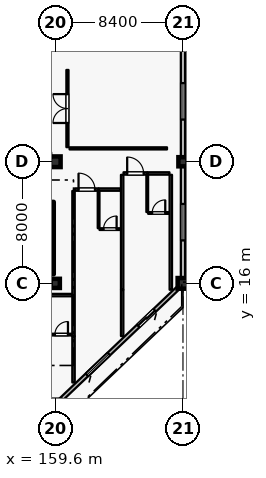
"""IFC4 building model, lengths in metres.
Left out: names, types, materials, properties, quantities, classifications, styles, units other than length and angle.
Written with IfcOpenShell. Run it as: python <this file> out.ifc"""

import sys

from ifc_helpers import new_model, si_unit, direction, frame, frame_2d, origin, origin_2d, place, context, subcontext, project, spatial, rectangle, extrude, element, fill, save


model = new_model("IFC4")
c1 = context("Model", 3, precision=1e-05, world=origin(), true_north=direction((0.0, 1.0)))
c2 = subcontext(c1, "Body", "Model", "MODEL_VIEW")
j1 = project(units=[si_unit("LENGTHUNIT", "METRE"), si_unit("PLANEANGLEUNIT", "RADIAN")], contexts=[c1])
p1 = place(None, origin())
s1 = spatial("IfcSite", under=j1, at=p1, CompositionType="ELEMENT")
p2 = place(p1, origin())
s2 = spatial("IfcBuilding", under=s1, at=p2, CompositionType="ELEMENT")
p3 = place(p2, frame((0.0, 0.0, 36.0)))
s3 = spatial("IfcBuildingStorey", under=s2, at=p3, CompositionType="ELEMENT", Elevation=36.0)
for number, where, z_axis, x_axis in (
    (1, (159.6, 24.0, 0.0), (0.0, 0.0, 1.0), (1.0, 0.0, 0.0)),
    (2, (168.0, 16.0, 0.0), (0.0, 0.0, 1.0), (1.0, 0.0, 0.0)),
):
    element("IfcColumn", number, at=place(p3, frame(where, z_axis=z_axis, x_axis=x_axis)), inside=s3, PredefinedType="COLUMN", context=c2, shape_type="SweptSolid", body=[
        extrude(rectangle(XDim=0.7, YDim=0.7, at=origin_2d()), origin(), (0.0, 0.0, 1.0), 3.6),
    ])
for number, where, z_axis, x_axis in (
    (3, (159.6, 16.0, 0.0), (0.0, 0.0, 1.0), (1.0, 0.0, 0.0)),
    (4, (168.0, 24.0, 0.0), (0.0, 0.0, 1.0), (1.0, 0.0, 0.0)),
):
    element("IfcColumn", number, at=place(p3, frame(where, z_axis=z_axis, x_axis=x_axis)), inside=s3, PredefinedType="COLUMN", context=c2, shape_type="SweptSolid", body=[
        extrude(rectangle(XDim=0.6, YDim=0.6, at=origin_2d()), origin(), (0.0, 0.0, 1.0), 3.6),
    ])
p4 = place(p3, frame((167.65, 15.667, 0.0), z_axis=(0.0, 0.0, 1.0), x_axis=(-0.724105170588, -0.689689569247, 0.0)))
e5 = element("IfcWall", 5, at=p4, inside=s3, PredefinedType="SOLIDWALL", context=c2, shape_type="SweptSolid", body=[
    extrude(rectangle(XDim=10.634, YDim=0.24, at=frame_2d((5.317, 0.0))), origin(), (0.0, 0.0, 1.0), 2.94),
])
p5 = place(p4, frame((2.081, 0.0, 0.0)))
e6 = element("IfcOpeningElement", 6, at=p5, cuts=e5, PredefinedType="OPENING", context=c2, shape_type="SweptSolid", body=[
    extrude(rectangle(XDim=1.5, YDim=2.25, at=frame_2d((0.75, 1.125))), frame((0.0, 0.13, 0.0), z_axis=(0.0, -1.0, 0.0), x_axis=(1.0, 0.0, 0.0)), (0.0, 0.0, 1.0), 0.26),
])
p6 = place(p4, frame((6.25, 0.0, 0.8)))
e7 = element("IfcOpeningElement", 7, at=p6, cuts=e5, PredefinedType="OPENING", context=c2, shape_type="SweptSolid", body=[
    extrude(rectangle(XDim=2.0, YDim=1.75, at=frame_2d((1.0, 0.875))), frame((0.0, 0.13, 0.0), z_axis=(0.0, -1.0, 0.0), x_axis=(1.0, 0.0, 0.0)), (0.0, 0.0, 1.0), 0.26),
])
p7 = place(p3, frame((168.0, 31.65, 0.0), z_axis=(0.0, 0.0, 1.0), x_axis=(0.0, -1.0, 0.0)))
e8 = element("IfcWall", 8, at=p7, inside=s3, PredefinedType="SOLIDWALL", context=c2, shape_type="SweptSolid", body=[
    extrude(rectangle(XDim=7.35, YDim=0.28, at=frame_2d((3.675, 0.0))), origin(), (0.0, 0.0, 1.0), 2.7),
])
p8 = place(p7, frame((2.475, 0.0, 0.5)))
e9 = element("IfcOpeningElement", 9, at=p8, cuts=e8, PredefinedType="OPENING", context=c2, shape_type="SweptSolid", body=[
    extrude(rectangle(XDim=2.4, YDim=1.65, at=frame_2d((1.2, 0.825))), frame((0.0, 0.15, 0.0), z_axis=(0.0, -1.0, 0.0), x_axis=(1.0, 0.0, 0.0)), (0.0, 0.0, 1.0), 0.3),
])
p9 = place(p3, frame((168.0, 23.7, 0.0), z_axis=(0.0, 0.0, 1.0), x_axis=(0.0, -1.0, 0.0)))
e10 = element("IfcWall", 10, at=p9, inside=s3, PredefinedType="SOLIDWALL", context=c2, shape_type="SweptSolid", body=[
    extrude(rectangle(XDim=7.35, YDim=0.28, at=frame_2d((3.675, 0.0))), origin(), (0.0, 0.0, 1.0), 2.7),
])
p10 = place(p9, frame((2.475, 0.0, 0.5)))
e11 = element("IfcOpeningElement", 11, at=p10, cuts=e10, PredefinedType="OPENING", context=c2, shape_type="SweptSolid", body=[
    extrude(rectangle(XDim=2.4, YDim=1.65, at=frame_2d((1.2, 0.825))), frame((0.0, 0.15, 0.0), z_axis=(0.0, -1.0, 0.0), x_axis=(1.0, 0.0, 0.0)), (0.0, 0.0, 1.0), 0.3),
])
p11 = place(p3, frame((151.3, 16.8, 0.0), z_axis=(0.0, 0.0, 1.0), x_axis=(1.0, 0.0, 0.0)))
e12 = element("IfcWall", 12, at=p11, inside=s3, PredefinedType="SHEAR", context=c2, shape_type="SweptSolid", body=[
    extrude(rectangle(XDim=8.2, YDim=0.4, at=frame_2d((4.1, 0.0))), origin(), (0.0, 0.0, 1.0), 3.365),
])
p12 = place(p3, frame((159.3, 17.005, 0.0), z_axis=(0.0, 0.0, 1.0), x_axis=(0.0, 1.0, 0.0)))
e13 = element("IfcWall", 13, at=p12, inside=s3, PredefinedType="SHEAR", context=c2, shape_type="SweptSolid", body=[
    extrude(rectangle(XDim=3.95, YDim=0.4, at=frame_2d((1.975, 0.0))), origin(), (0.0, 0.0, 1.0), 3.365),
])
p13 = place(p3, frame((151.3, 21.16, 0.0), z_axis=(0.0, 0.0, 1.0), x_axis=(1.0, 0.0, 0.0)))
e14 = element("IfcWall", 14, at=p13, inside=s3, PredefinedType="SHEAR", context=c2, shape_type="SweptSolid", body=[
    extrude(rectangle(XDim=8.2, YDim=0.4, at=frame_2d((4.1, 0.0))), origin(), (0.0, 0.0, 1.0), 3.365),
])
p14 = place(p13, frame((0.43, 0.0, 0.0)))
e15 = element("IfcOpeningElement", 15, at=p14, cuts=e14, PredefinedType="OPENING", context=c2, shape_type="SweptSolid", body=[
    extrude(rectangle(XDim=1.16, YDim=2.2, at=frame_2d((0.58, 1.1))), frame((0.0, 0.21, 0.0), z_axis=(0.0, -1.0, 0.0), x_axis=(1.0, 0.0, 0.0)), (0.0, 0.0, 1.0), 0.42),
])
p15 = place(p3, frame((159.26, 15.23, 0.0), z_axis=(0.0, 0.0, 1.0), x_axis=(1.0, 0.0, 0.0)))
e16 = element("IfcWall", 16, at=p15, inside=s3, PredefinedType="PARTITIONING", context=c2, shape_type="SweptSolid", body=[
    extrude(rectangle(XDim=1.45, YDim=0.16, at=frame_2d((0.725, 0.0))), origin(), (0.0, 0.0, 1.0), 3.365),
])
p16 = place(p3, frame((159.31, 12.63, 0.0), z_axis=(0.0, 0.0, 1.0), x_axis=(1.0, 0.0, 0.0)))
e17 = element("IfcWall", 17, at=p16, inside=s3, PredefinedType="PARTITIONING", context=c2, shape_type="SweptSolid", body=[
    extrude(rectangle(XDim=1.39, YDim=0.115, at=frame_2d((0.695, 0.0))), origin(), (0.0, 0.0, 1.0), 3.365),
])
p17 = place(p16, frame((0.265, 0.0, 0.0)))
e18 = element("IfcOpeningElement", 18, at=p17, cuts=e17, PredefinedType="OPENING", context=c2, shape_type="SweptSolid", body=[
    extrude(rectangle(XDim=0.86, YDim=2.12, at=frame_2d((0.43, 1.06))), frame((0.0, 0.067, 0.0), z_axis=(0.0, -1.0, 0.0), x_axis=(1.0, 0.0, 0.0)), (0.0, 0.0, 1.0), 0.135),
])
p18 = place(p3, frame((160.8, 9.48, 0.0), z_axis=(0.0, 0.0, 1.0), x_axis=(0.0, 1.0, 0.0)))
e19 = element("IfcWall", 19, at=p18, inside=s3, PredefinedType="PARTITIONING", context=c2, shape_type="SweptSolid", body=[
    extrude(rectangle(XDim=3.04, YDim=0.16, at=frame_2d((1.52, 0.0))), origin(), (0.0, 0.0, 1.0), 3.365),
])
p19 = place(p3, frame((160.89, 22.17, 0.0), z_axis=(0.0, 0.0, 1.0), x_axis=(1.0, 0.0, 0.0)))
e20 = element("IfcWall", 20, at=p19, inside=s3, PredefinedType="PARTITIONING", context=c2, shape_type="SweptSolid", body=[
    extrude(rectangle(XDim=1.56, YDim=0.16, at=frame_2d((0.78, 0.0))), origin(), (0.0, 0.0, 1.0), 3.365),
])
p20 = place(p19, frame((0.24, 0.0, 0.0)))
e21 = element("IfcOpeningElement", 21, at=p20, cuts=e20, PredefinedType="OPENING", context=c2, shape_type="SweptSolid", body=[
    extrude(rectangle(XDim=1.08, YDim=2.3, at=frame_2d((0.54, 1.15))), frame((0.0, 0.09, 0.0), z_axis=(0.0, -1.0, 0.0), x_axis=(1.0, 0.0, 0.0)), (0.0, 0.0, 1.0), 0.18),
])
p21 = place(p3, frame((162.46, 22.17, 0.0), z_axis=(0.0, 0.0, 1.0), x_axis=(1.0, 0.0, 0.0)))
e22 = element("IfcWall", 22, at=p21, inside=s3, PredefinedType="PARTITIONING", context=c2, shape_type="SweptSolid", body=[
    extrude(rectangle(XDim=1.45, YDim=0.16, at=frame_2d((0.725, 0.0))), origin(), (0.0, 0.0, 1.0), 3.365),
])
p22 = place(p3, frame((162.45, 19.63, 0.0), z_axis=(0.0, 0.0, 1.0), x_axis=(0.0, 1.0, 0.0)))
e23 = element("IfcWall", 23, at=p22, inside=s3, PredefinedType="PARTITIONING", context=c2, shape_type="SweptSolid", body=[
    extrude(rectangle(XDim=2.45, YDim=0.115, at=frame_2d((1.225, 0.0))), origin(), (0.0, 0.0, 1.0), 3.365),
])
p23 = place(p3, frame((162.51, 19.57, 0.0), z_axis=(0.0, 0.0, 1.0), x_axis=(1.0, 0.0, 0.0)))
e24 = element("IfcWall", 24, at=p23, inside=s3, PredefinedType="PARTITIONING", context=c2, shape_type="SweptSolid", body=[
    extrude(rectangle(XDim=1.39, YDim=0.115, at=frame_2d((0.695, 0.0))), origin(), (0.0, 0.0, 1.0), 3.365),
])
p24 = place(p23, frame((0.265, 0.0, 0.0)))
e25 = element("IfcOpeningElement", 25, at=p24, cuts=e24, PredefinedType="OPENING", context=c2, shape_type="SweptSolid", body=[
    extrude(rectangle(XDim=0.86, YDim=2.12, at=frame_2d((0.43, 1.06))), frame((0.0, 0.067, 0.0), z_axis=(0.0, -1.0, 0.0), x_axis=(1.0, 0.0, 0.0)), (0.0, 0.0, 1.0), 0.135),
])
p25 = place(p3, frame((160.8, 12.53, 0.0), z_axis=(0.0, 0.0, 1.0), x_axis=(0.0, 1.0, 0.0)))
e26 = element("IfcWall", 26, at=p25, inside=s3, PredefinedType="PARTITIONING", context=c2, shape_type="SweptSolid", body=[
    extrude(rectangle(XDim=9.55, YDim=0.16, at=frame_2d((4.775, 0.0))), origin(), (0.0, 0.0, 1.0), 3.365),
])
p26 = place(p3, frame((164.0, 12.53, 0.0), z_axis=(0.0, 0.0, 1.0), x_axis=(0.0, 1.0, 0.0)))
e27 = element("IfcWall", 27, at=p26, inside=s3, PredefinedType="PARTITIONING", context=c2, shape_type="SweptSolid", body=[
    extrude(rectangle(XDim=3.04, YDim=0.16, at=frame_2d((1.52, 0.0))), origin(), (0.0, 0.0, 1.0), 3.365),
])
p27 = place(p3, frame((164.09, 23.23, 0.0), z_axis=(0.0, 0.0, 1.0), x_axis=(1.0, 0.0, 0.0)))
e28 = element("IfcWall", 28, at=p27, inside=s3, PredefinedType="PARTITIONING", context=c2, shape_type="SweptSolid", body=[
    extrude(rectangle(XDim=1.56, YDim=0.16, at=frame_2d((0.78, 0.0))), origin(), (0.0, 0.0, 1.0), 3.365),
])
p28 = place(p27, frame((0.24, 0.0, 0.0)))
e29 = element("IfcOpeningElement", 29, at=p28, cuts=e28, PredefinedType="OPENING", context=c2, shape_type="SweptSolid", body=[
    extrude(rectangle(XDim=1.08, YDim=2.3, at=frame_2d((0.54, 1.15))), frame((0.0, 0.09, 0.0), z_axis=(0.0, -1.0, 0.0), x_axis=(1.0, 0.0, 0.0)), (0.0, 0.0, 1.0), 0.18),
])
p29 = place(p3, frame((165.66, 23.23, 0.0), z_axis=(0.0, 0.0, 1.0), x_axis=(1.0, 0.0, 0.0)))
e30 = element("IfcWall", 30, at=p29, inside=s3, PredefinedType="PARTITIONING", context=c2, shape_type="SweptSolid", body=[
    extrude(rectangle(XDim=1.45, YDim=0.16, at=frame_2d((0.725, 0.0))), origin(), (0.0, 0.0, 1.0), 3.365),
])
p30 = place(p3, frame((165.65, 20.69, 0.0), z_axis=(0.0, 0.0, 1.0), x_axis=(0.0, 1.0, 0.0)))
e31 = element("IfcWall", 31, at=p30, inside=s3, PredefinedType="PARTITIONING", context=c2, shape_type="SweptSolid", body=[
    extrude(rectangle(XDim=2.45, YDim=0.115, at=frame_2d((1.225, 0.0))), origin(), (0.0, 0.0, 1.0), 3.365),
])
p31 = place(p3, frame((165.71, 20.63, 0.0), z_axis=(0.0, 0.0, 1.0), x_axis=(1.0, 0.0, 0.0)))
e32 = element("IfcWall", 32, at=p31, inside=s3, PredefinedType="PARTITIONING", context=c2, shape_type="SweptSolid", body=[
    extrude(rectangle(XDim=1.39, YDim=0.115, at=frame_2d((0.695, 0.0))), origin(), (0.0, 0.0, 1.0), 3.365),
])
p32 = place(p31, frame((0.265, 0.0, 0.0)))
e33 = element("IfcOpeningElement", 33, at=p32, cuts=e32, PredefinedType="OPENING", context=c2, shape_type="SweptSolid", body=[
    extrude(rectangle(XDim=0.86, YDim=2.12, at=frame_2d((0.43, 1.06))), frame((0.0, 0.067, 0.0), z_axis=(0.0, -1.0, 0.0), x_axis=(1.0, 0.0, 0.0)), (0.0, 0.0, 1.0), 0.135),
])
for number, where, z_axis, x_axis in (
    (34, (164.0, 15.58, 0.0), (0.0, 0.0, 1.0), (0.0, 1.0, 0.0)),
    (35, (167.2, 15.58, 0.0), (0.0, 0.0, 1.0), (0.0, 1.0, 0.0)),
):
    element("IfcWall", number, at=place(p3, frame(where, z_axis=z_axis, x_axis=x_axis)), inside=s3, PredefinedType="PARTITIONING", context=c2, shape_type="SweptSolid", body=[
        extrude(rectangle(XDim=7.56, YDim=0.16, at=frame_2d((3.78, 0.0))), origin(), (0.0, 0.0, 1.0), 3.365),
    ])
p33 = place(p3, frame((160.4, 24.96, 0.0), z_axis=(0.0, 0.0, 1.0), x_axis=(0.0, 1.0, 0.0)))
e36 = element("IfcWall", 36, at=p33, inside=s3, PredefinedType="PARTITIONING", context=c2, shape_type="SweptSolid", body=[
    extrude(rectangle(XDim=5.08, YDim=0.14, at=frame_2d((2.54, 0.0))), origin(), (0.0, 0.0, 1.0), 3.365),
])
p34 = place(p33, frame((1.59, 0.0, 0.0)))
e37 = element("IfcOpeningElement", 37, at=p34, cuts=e36, PredefinedType="OPENING", context=c2, shape_type="SweptSolid", body=[
    extrude(rectangle(XDim=1.9, YDim=2.4, at=frame_2d((0.95, 1.2))), frame((0.0, 0.08, 0.0), z_axis=(0.0, -1.0, 0.0), x_axis=(1.0, 0.0, 0.0)), (0.0, 0.0, 1.0), 0.16),
])
p35 = place(p3, frame((160.54, 24.88, 0.0), z_axis=(0.0, 0.0, 1.0), x_axis=(1.0, 0.0, 0.0)))
e38 = element("IfcWall", 38, at=p35, inside=s3, PredefinedType="PARTITIONING", context=c2, shape_type="SweptSolid", body=[
    extrude(rectangle(XDim=6.41, YDim=0.14, at=frame_2d((3.205, 0.0))), origin(), (0.0, 0.0, 1.0), 3.365),
])
p36 = place(p5, origin())
e39 = element("IfcDoor", 39, at=p36, inside=s3, OperationType="SLIDING_TO_LEFT", PredefinedType="DOOR", context=c2, shape_type="SweptSolid", body=[
    extrude(rectangle(XDim=1.5, YDim=2.25, at=frame_2d((0.75, 1.125))), frame((0.0, 0.025, 0.0), z_axis=(0.0, -1.0, 0.0), x_axis=(1.0, 0.0, 0.0)), (0.0, 0.0, 1.0), 0.05),
])
fill(e6, e39)
p37 = place(p6, origin())
e40 = element("IfcWindow", 40, at=p37, inside=s3, PartitioningType="DOUBLE_PANEL_VERTICAL", PredefinedType="WINDOW", context=c2, shape_type="SweptSolid", body=[
    extrude(rectangle(XDim=2.0, YDim=1.75, at=frame_2d((1.0, 0.875))), frame((0.0, 0.03, 0.0), z_axis=(0.0, -1.0, 0.0), x_axis=(1.0, 0.0, 0.0)), (0.0, 0.0, 1.0), 0.06),
])
fill(e7, e40)
p38 = place(p8, origin())
e41 = element("IfcWindow", 41, at=p38, inside=s3, PartitioningType="DOUBLE_PANEL_VERTICAL", PredefinedType="WINDOW", context=c2, shape_type="SweptSolid", body=[
    extrude(rectangle(XDim=2.4, YDim=1.65, at=frame_2d((1.2, 0.825))), frame((0.0, 0.03, 0.0), z_axis=(0.0, -1.0, 0.0), x_axis=(1.0, 0.0, 0.0)), (0.0, 0.0, 1.0), 0.06),
])
fill(e9, e41)
p39 = place(p10, origin())
e42 = element("IfcWindow", 42, at=p39, inside=s3, PartitioningType="DOUBLE_PANEL_VERTICAL", PredefinedType="WINDOW", context=c2, shape_type="SweptSolid", body=[
    extrude(rectangle(XDim=2.4, YDim=1.65, at=frame_2d((1.2, 0.825))), frame((0.0, 0.03, 0.0), z_axis=(0.0, -1.0, 0.0), x_axis=(1.0, 0.0, 0.0)), (0.0, 0.0, 1.0), 0.06),
])
fill(e11, e42)
p40 = place(p17, origin())
e43 = element("IfcDoor", 43, at=p40, inside=s3, OperationType="SINGLE_SWING_RIGHT", PredefinedType="DOOR", context=c2, shape_type="SweptSolid", body=[
    extrude(rectangle(XDim=0.86, YDim=2.12, at=frame_2d((0.43, 1.06))), frame((0.0, 0.025, 0.0), z_axis=(0.0, -1.0, 0.0), x_axis=(1.0, 0.0, 0.0)), (0.0, 0.0, 1.0), 0.05),
])
fill(e18, e43)
p41 = place(p20, origin())
e44 = element("IfcDoor", 44, at=p41, inside=s3, OperationType="SINGLE_SWING_LEFT", PredefinedType="DOOR", context=c2, shape_type="SweptSolid", body=[
    extrude(rectangle(XDim=1.08, YDim=2.3, at=frame_2d((0.54, 1.15))), frame((0.0, 0.025, 0.0), z_axis=(0.0, -1.0, 0.0), x_axis=(1.0, 0.0, 0.0)), (0.0, 0.0, 1.0), 0.05),
])
fill(e21, e44)
p42 = place(p24, origin())
e45 = element("IfcDoor", 45, at=p42, inside=s3, OperationType="SINGLE_SWING_RIGHT", PredefinedType="DOOR", context=c2, shape_type="SweptSolid", body=[
    extrude(rectangle(XDim=0.86, YDim=2.12, at=frame_2d((0.43, 1.06))), frame((0.0, 0.025, 0.0), z_axis=(0.0, -1.0, 0.0), x_axis=(1.0, 0.0, 0.0)), (0.0, 0.0, 1.0), 0.05),
])
fill(e25, e45)
p43 = place(p28, origin())
e46 = element("IfcDoor", 46, at=p43, inside=s3, OperationType="SINGLE_SWING_LEFT", PredefinedType="DOOR", context=c2, shape_type="SweptSolid", body=[
    extrude(rectangle(XDim=1.08, YDim=2.3, at=frame_2d((0.54, 1.15))), frame((0.0, 0.025, 0.0), z_axis=(0.0, -1.0, 0.0), x_axis=(1.0, 0.0, 0.0)), (0.0, 0.0, 1.0), 0.05),
])
fill(e29, e46)
p44 = place(p32, origin())
e47 = element("IfcDoor", 47, at=p44, inside=s3, OperationType="SINGLE_SWING_RIGHT", PredefinedType="DOOR", context=c2, shape_type="SweptSolid", body=[
    extrude(rectangle(XDim=0.86, YDim=2.12, at=frame_2d((0.43, 1.06))), frame((0.0, 0.025, 0.0), z_axis=(0.0, -1.0, 0.0), x_axis=(1.0, 0.0, 0.0)), (0.0, 0.0, 1.0), 0.05),
])
fill(e33, e47)
p45 = place(p34, origin())
e48 = element("IfcDoor", 48, at=p45, inside=s3, OperationType="DOUBLE_DOOR_SINGLE_SWING", PredefinedType="DOOR", context=c2, shape_type="SweptSolid", body=[
    extrude(rectangle(XDim=1.9, YDim=2.4, at=frame_2d((0.95, 1.2))), frame((0.0, 0.025, 0.0), z_axis=(0.0, -1.0, 0.0), x_axis=(1.0, 0.0, 0.0)), (0.0, 0.0, 1.0), 0.05),
])
fill(e37, e48)
save(model, sys.argv[1])
